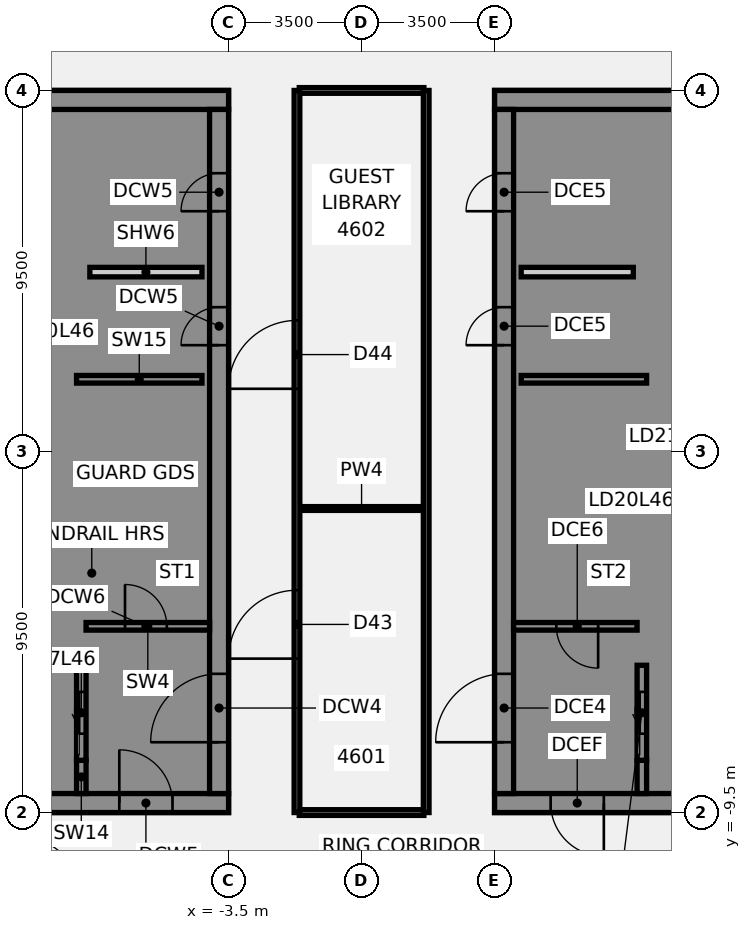
"""IFC4 building model, lengths in metres.
Left out: names, types, materials, properties, quantities, classifications, styles, units other than length and angle.
Written with IfcOpenShell. Run it as: python <this file> out.ifc"""

import sys

from ifc_helpers import new_model, si_unit, direction, frame, frame_2d, origin, place, context, subcontext, project, spatial, polyline, rectangle, outline, extrude, element, fill, save


model = new_model("IFC4")
c1 = context("Model", 3, precision=1e-05, world=origin(), true_north=direction((0.0, 1.0)))
c2 = subcontext(c1, "Body", "Model", "MODEL_VIEW")
j1 = project(units=[si_unit("LENGTHUNIT", "METRE"), si_unit("PLANEANGLEUNIT", "RADIAN")], contexts=[c1])
p1 = place(None, origin())
s1 = spatial("IfcSite", under=j1, at=p1, CompositionType="ELEMENT")
p2 = place(p1, origin())
s2 = spatial("IfcBuilding", under=s1, at=p2, CompositionType="ELEMENT")
p3 = place(p2, frame((0.0, 0.0, 186.1)))
s3 = spatial("IfcBuildingStorey", under=s2, at=p3, CompositionType="ELEMENT", Elevation=186.1)
p4 = place(p3, frame((-1.64, -9.5, 0.0), z_axis=(0.0, 0.0, 1.0), x_axis=(1.0, 0.0, 0.0)))
e1 = element("IfcWall", 1, at=p4, inside=s3, PredefinedType="PARTITIONING", context=c2, shape_type="SweptSolid", body=[
    extrude(rectangle(XDim=3.28, YDim=0.15, at=frame_2d((1.64, 0.0))), origin(), (0.0, 0.0, 1.0), 2.864),
])
p5 = place(p3, frame((-1.64, -1.5, 0.0), z_axis=(0.0, 0.0, 1.0), x_axis=(1.0, 0.0, 0.0)))
e2 = element("IfcWall", 2, at=p5, inside=s3, PredefinedType="PARTITIONING", context=c2, shape_type="SweptSolid", body=[
    extrude(rectangle(XDim=3.28, YDim=0.1, at=frame_2d((1.64, 0.0))), origin(), (0.0, 0.0, 1.0), 2.864),
])
p6 = place(p3, frame((-1.64, 9.5, 0.0), z_axis=(0.0, 0.0, 1.0), x_axis=(1.0, 0.0, 0.0)))
e3 = element("IfcWall", 3, at=p6, inside=s3, PredefinedType="PARTITIONING", context=c2, shape_type="SweptSolid", body=[
    extrude(rectangle(XDim=3.28, YDim=0.15, at=frame_2d((1.64, 0.0))), origin(), (0.0, 0.0, 1.0), 2.864),
])
p7 = place(p3, frame((-1.7, -9.5, 0.0), z_axis=(0.0, 0.0, 1.0), x_axis=(0.0, 1.0, 0.0)))
e4 = element("IfcWall", 4, at=p7, inside=s3, PredefinedType="PARTITIONING", context=c2, shape_type="SweptSolid", body=[
    extrude(rectangle(XDim=19.0, YDim=0.15, at=frame_2d((9.5, 0.0))), origin(), (0.0, 0.0, 1.0), 2.864),
])
p8 = place(p7, frame((4.05, 0.0, 0.0)))
e5 = element("IfcOpeningElement", 5, at=p8, cuts=e4, PredefinedType="OPENING", context=c2, shape_type="SweptSolid", body=[
    extrude(rectangle(XDim=1.8, YDim=2.1, at=frame_2d((0.9, 1.05))), frame((0.0, 0.085, 0.0), z_axis=(0.0, -1.0, 0.0), x_axis=(1.0, 0.0, 0.0)), (0.0, 0.0, 1.0), 0.17),
])
p9 = place(p7, frame((11.15, 0.0, 0.0)))
e6 = element("IfcOpeningElement", 6, at=p9, cuts=e4, PredefinedType="OPENING", context=c2, shape_type="SweptSolid", body=[
    extrude(rectangle(XDim=1.8, YDim=2.1, at=frame_2d((0.9, 1.05))), frame((0.0, 0.085, 0.0), z_axis=(0.0, -1.0, 0.0), x_axis=(1.0, 0.0, 0.0)), (0.0, 0.0, 1.0), 0.17),
])
p10 = place(p3, frame((1.7, -9.5, 0.0), z_axis=(0.0, 0.0, 1.0), x_axis=(0.0, 1.0, 0.0)))
e7 = element("IfcWall", 7, at=p10, inside=s3, PredefinedType="PARTITIONING", context=c2, shape_type="SweptSolid", body=[
    extrude(rectangle(XDim=19.0, YDim=0.15, at=frame_2d((9.5, 0.0))), origin(), (0.0, 0.0, 1.0), 2.864),
])
p11 = place(p3, frame((-16.5, -9.25, 0.0), z_axis=(0.0, 0.0, 1.0), x_axis=(1.0, 0.0, 0.0)))
e8 = element("IfcWall", 8, at=p11, inside=s3, PredefinedType="SHEAR", context=c2, shape_type="SweptSolid", body=[
    extrude(rectangle(XDim=13.0, YDim=0.5, at=frame_2d((6.5, 0.0))), origin(), (0.0, 0.0, 1.0), 3.46),
])
p12 = place(p11, frame((4.15, 0.0, 0.0)))
e9 = element("IfcOpeningElement", 9, at=p12, cuts=e8, PredefinedType="OPENING", context=c2, shape_type="SweptSolid", body=[
    extrude(rectangle(XDim=1.4, YDim=2.1, at=frame_2d((0.7, 1.05))), frame((0.0, 0.26, 0.0), z_axis=(0.0, -1.0, 0.0), x_axis=(1.0, 0.0, 0.0)), (0.0, 0.0, 1.0), 0.52),
])
p13 = place(p11, frame((10.125, 0.0, 0.0)))
e10 = element("IfcOpeningElement", 10, at=p13, cuts=e8, PredefinedType="OPENING", context=c2, shape_type="SweptSolid", body=[
    extrude(rectangle(XDim=1.4, YDim=2.1, at=frame_2d((0.7, 1.05))), frame((0.0, 0.26, 0.0), z_axis=(0.0, -1.0, 0.0), x_axis=(1.0, 0.0, 0.0)), (0.0, 0.0, 1.0), 0.52),
])
p14 = place(p3, frame((-16.5, 9.25, 0.0), z_axis=(0.0, 0.0, 1.0), x_axis=(1.0, 0.0, 0.0)))
e11 = element("IfcWall", 11, at=p14, inside=s3, PredefinedType="SHEAR", context=c2, shape_type="SweptSolid", body=[
    extrude(rectangle(XDim=13.0, YDim=0.5, at=frame_2d((6.5, 0.0))), origin(), (0.0, 0.0, 1.0), 3.46),
])
p15 = place(p3, origin())
e12 = element("IfcWall", 12, at=p15, inside=s3, PredefinedType="SHEAR", context=c2, shape_type="SweptSolid", body=[
    extrude(outline(polyline([(-9.8, -5.375), (-9.8, -5.625), (-7.5, -5.625), (-7.25, -5.625), (-7.25, 9.0), (-7.5, 9.0), (-9.8, 9.0), (-9.8, 8.125), (-7.5, 8.125), (-7.5, 5.625), (-9.8, 5.625), (-9.8, 5.375), (-7.5, 5.375), (-7.5, 2.875), (-9.8, 2.875), (-9.8, 2.625), (-7.5, 2.625), (-7.5, 0.125), (-9.8, 0.125), (-9.8, -0.125), (-7.5, -0.125), (-7.5, -2.625), (-9.8, -2.625), (-9.8, -2.875), (-7.5, -2.875), (-7.5, -5.375), (-9.8, -5.375)])), origin(), (0.0, 0.0, 1.0), 3.46),
])
p16 = place(p3, origin())
e13 = element("IfcWall", 13, at=p16, inside=s3, PredefinedType="SHEAR", context=c2, shape_type="SweptSolid", body=[
    extrude(outline(polyline([(-7.5, -8.125), (-9.55, -8.125), (-9.55, -5.625), (-9.8, -5.625), (-9.8, -8.125), (-9.8, -9.0), (-7.5, -9.0), (-7.5, -8.125)])), origin(), (0.0, 0.0, 1.0), 3.46),
])
p17 = place(p3, frame((-7.375, -9.0, 0.0), z_axis=(0.0, 0.0, 1.0), x_axis=(0.0, 1.0, 0.0)))
e14 = element("IfcWall", 14, at=p17, inside=s3, PredefinedType="SHEAR", context=c2, shape_type="SweptSolid", body=[
    extrude(rectangle(XDim=0.875, YDim=0.25, at=frame_2d((0.438, 0.0))), origin(), (0.0, 0.0, 1.0), 3.46),
])
p18 = place(p3, frame((-7.5, 1.9, 0.0), z_axis=(0.0, 0.0, 1.0), x_axis=(1.0, 0.0, 0.0)))
e15 = element("IfcWall", 15, at=p18, inside=s3, PredefinedType="SHEAR", context=c2, shape_type="SweptSolid", body=[
    extrude(rectangle(XDim=3.3, YDim=0.2, at=frame_2d((1.65, 0.0))), origin(), (0.0, 0.0, 1.0), 3.46),
])
p19 = place(p3, frame((-7.375, -8.125, 0.0), z_axis=(0.0, 0.0, 1.0), x_axis=(0.0, 1.0, 0.0)))
e16 = element("IfcWall", 16, at=p19, inside=s3, PredefinedType="SHEAR", context=c2, shape_type="SweptSolid", body=[
    extrude(rectangle(XDim=2.5, YDim=0.25, at=frame_2d((1.25, 0.0))), origin(), (0.0, 0.0, 1.0), 3.46),
])
p20 = place(p19, frame((0.7, 0.0, 0.0)))
e17 = element("IfcOpeningElement", 17, at=p20, cuts=e16, PredefinedType="OPENING", context=c2, shape_type="SweptSolid", body=[
    extrude(rectangle(XDim=1.1, YDim=2.1, at=frame_2d((0.55, 1.05))), frame((0.0, 0.135, 0.0), z_axis=(0.0, -1.0, 0.0), x_axis=(1.0, 0.0, 0.0)), (0.0, 0.0, 1.0), 0.27),
])
p21 = place(p3, frame((-3.75, -9.0, 0.0), z_axis=(0.0, 0.0, 1.0), x_axis=(0.0, 1.0, 0.0)))
e18 = element("IfcWall", 18, at=p21, inside=s3, PredefinedType="SHEAR", context=c2, shape_type="SweptSolid", body=[
    extrude(rectangle(XDim=18.0, YDim=0.5, at=frame_2d((9.0, 0.0))), origin(), (0.0, 0.0, 1.0), 3.46),
])
p22 = place(p21, frame((1.35, 0.0, 0.0)))
e19 = element("IfcOpeningElement", 19, at=p22, cuts=e18, PredefinedType="OPENING", context=c2, shape_type="SweptSolid", body=[
    extrude(rectangle(XDim=1.8, YDim=2.1, at=frame_2d((0.9, 1.05))), frame((0.0, 0.26, 0.0), z_axis=(0.0, -1.0, 0.0), x_axis=(1.0, 0.0, 0.0)), (0.0, 0.0, 1.0), 0.52),
])
p23 = place(p21, frame((11.798, 0.0, 0.0)))
e20 = element("IfcOpeningElement", 20, at=p23, cuts=e18, PredefinedType="OPENING", context=c2, shape_type="SweptSolid", body=[
    extrude(rectangle(XDim=1.0, YDim=2.1, at=frame_2d((0.5, 1.05))), frame((0.0, 0.26, 0.0), z_axis=(0.0, -1.0, 0.0), x_axis=(1.0, 0.0, 0.0)), (0.0, 0.0, 1.0), 0.52),
])
p24 = place(p21, frame((15.323, 0.0, 0.0)))
e21 = element("IfcOpeningElement", 21, at=p24, cuts=e18, PredefinedType="OPENING", context=c2, shape_type="SweptSolid", body=[
    extrude(rectangle(XDim=1.0, YDim=2.1, at=frame_2d((0.5, 1.05))), frame((0.0, 0.26, 0.0), z_axis=(0.0, -1.0, 0.0), x_axis=(1.0, 0.0, 0.0)), (0.0, 0.0, 1.0), 0.52),
])
p25 = place(p3, frame((-7.15, 4.72, 0.0), z_axis=(0.0, 0.0, 1.0), x_axis=(1.0, 0.0, 0.0)))
e22 = element("IfcWall", 22, at=p25, inside=s3, PredefinedType="PARTITIONING", context=c2, shape_type="SweptSolid", body=[
    extrude(rectangle(XDim=2.95, YDim=0.25, at=frame_2d((1.475, 0.0))), origin(), (0.0, 0.0, 1.0), 3.46),
])
p26 = place(p3, frame((-7.25, -4.6, 0.0), z_axis=(0.0, 0.0, 1.0), x_axis=(1.0, 0.0, 0.0)))
e23 = element("IfcWall", 23, at=p26, inside=s3, PredefinedType="SHEAR", context=c2, shape_type="SweptSolid", body=[
    extrude(rectangle(XDim=3.25, YDim=0.2, at=frame_2d((1.625, 0.0))), origin(), (0.0, 0.0, 1.0), 3.46),
])
p27 = place(p26, frame((1.025, 0.0, 0.0)))
e24 = element("IfcOpeningElement", 24, at=p27, cuts=e23, PredefinedType="OPENING", context=c2, shape_type="SweptSolid", body=[
    extrude(rectangle(XDim=1.1, YDim=2.1, at=frame_2d((0.55, 1.05))), frame((0.0, 0.11, 0.0), z_axis=(0.0, -1.0, 0.0), x_axis=(1.0, 0.0, 0.0)), (0.0, 0.0, 1.0), 0.22),
])
p28 = place(p3, frame((16.5, -9.25, 0.0), z_axis=(0.0, 0.0, 1.0), x_axis=(-1.0, 0.0, 0.0)))
e25 = element("IfcWall", 25, at=p28, inside=s3, PredefinedType="SHEAR", context=c2, shape_type="SweptSolid", body=[
    extrude(rectangle(XDim=13.0, YDim=0.5, at=frame_2d((6.5, 0.0))), origin(), (0.0, 0.0, 1.0), 3.46),
])
p29 = place(p28, frame((4.15, 0.0, 0.0)))
e26 = element("IfcOpeningElement", 26, at=p29, cuts=e25, PredefinedType="OPENING", context=c2, shape_type="SweptSolid", body=[
    extrude(rectangle(XDim=1.4, YDim=2.1, at=frame_2d((0.7, 1.05))), frame((0.0, 0.26, 0.0), z_axis=(0.0, -1.0, 0.0), x_axis=(1.0, 0.0, 0.0)), (0.0, 0.0, 1.0), 0.52),
])
p30 = place(p28, frame((10.125, 0.0, 0.0)))
e27 = element("IfcOpeningElement", 27, at=p30, cuts=e25, PredefinedType="OPENING", context=c2, shape_type="SweptSolid", body=[
    extrude(rectangle(XDim=1.4, YDim=2.1, at=frame_2d((0.7, 1.05))), frame((0.0, 0.26, 0.0), z_axis=(0.0, -1.0, 0.0), x_axis=(1.0, 0.0, 0.0)), (0.0, 0.0, 1.0), 0.52),
])
p31 = place(p3, frame((16.5, 9.25, 0.0), z_axis=(0.0, 0.0, 1.0), x_axis=(-1.0, 0.0, 0.0)))
e28 = element("IfcWall", 28, at=p31, inside=s3, PredefinedType="SHEAR", context=c2, shape_type="SweptSolid", body=[
    extrude(rectangle(XDim=13.0, YDim=0.5, at=frame_2d((6.5, 0.0))), origin(), (0.0, 0.0, 1.0), 3.46),
])
p32 = place(p3, origin())
e29 = element("IfcWall", 29, at=p32, inside=s3, PredefinedType="SHEAR", context=c2, shape_type="SweptSolid", body=[
    extrude(outline(polyline([(9.8, -5.375), (7.5, -5.375), (7.5, -2.875), (9.8, -2.875), (9.8, -2.625), (7.5, -2.625), (7.5, -0.125), (9.8, -0.125), (9.8, 0.125), (7.5, 0.125), (7.5, 2.625), (9.8, 2.625), (9.8, 2.875), (7.5, 2.875), (7.5, 5.375), (9.8, 5.375), (9.8, 5.625), (7.5, 5.625), (7.5, 8.125), (9.8, 8.125), (9.8, 9.0), (7.5, 9.0), (7.25, 9.0), (7.25, -5.625), (7.5, -5.625), (9.8, -5.625), (9.8, -5.375)])), origin(), (0.0, 0.0, 1.0), 3.46),
])
p33 = place(p3, origin())
e30 = element("IfcWall", 30, at=p33, inside=s3, PredefinedType="SHEAR", context=c2, shape_type="SweptSolid", body=[
    extrude(outline(polyline([(7.5, -8.125), (7.5, -9.0), (9.8, -9.0), (9.8, -8.125), (9.8, -5.625), (9.55, -5.625), (9.55, -8.125), (7.5, -8.125)])), origin(), (0.0, 0.0, 1.0), 3.46),
])
p34 = place(p3, frame((7.375, -9.0, 0.0), z_axis=(0.0, 0.0, 1.0), x_axis=(0.0, 1.0, 0.0)))
e31 = element("IfcWall", 31, at=p34, inside=s3, PredefinedType="SHEAR", context=c2, shape_type="SweptSolid", body=[
    extrude(rectangle(XDim=0.875, YDim=0.25, at=frame_2d((0.438, 0.0))), origin(), (0.0, 0.0, 1.0), 3.46),
])
p35 = place(p3, frame((7.5, 1.9, 0.0), z_axis=(0.0, 0.0, 1.0), x_axis=(-1.0, 0.0, 0.0)))
e32 = element("IfcWall", 32, at=p35, inside=s3, PredefinedType="SHEAR", context=c2, shape_type="SweptSolid", body=[
    extrude(rectangle(XDim=3.3, YDim=0.2, at=frame_2d((1.65, 0.0))), origin(), (0.0, 0.0, 1.0), 3.46),
])
p36 = place(p3, frame((7.375, -8.125, 0.0), z_axis=(0.0, 0.0, 1.0), x_axis=(0.0, 1.0, 0.0)))
e33 = element("IfcWall", 33, at=p36, inside=s3, PredefinedType="SHEAR", context=c2, shape_type="SweptSolid", body=[
    extrude(rectangle(XDim=2.5, YDim=0.25, at=frame_2d((1.25, 0.0))), origin(), (0.0, 0.0, 1.0), 3.46),
])
p37 = place(p36, frame((0.7, 0.0, 0.0)))
e34 = element("IfcOpeningElement", 34, at=p37, cuts=e33, PredefinedType="OPENING", context=c2, shape_type="SweptSolid", body=[
    extrude(rectangle(XDim=1.1, YDim=2.1, at=frame_2d((0.55, 1.05))), frame((0.0, 0.135, 0.0), z_axis=(0.0, -1.0, 0.0), x_axis=(1.0, 0.0, 0.0)), (0.0, 0.0, 1.0), 0.27),
])
p38 = place(p3, frame((3.75, -9.0, 0.0), z_axis=(0.0, 0.0, 1.0), x_axis=(0.0, 1.0, 0.0)))
e35 = element("IfcWall", 35, at=p38, inside=s3, PredefinedType="SHEAR", context=c2, shape_type="SweptSolid", body=[
    extrude(rectangle(XDim=18.0, YDim=0.5, at=frame_2d((9.0, 0.0))), origin(), (0.0, 0.0, 1.0), 3.46),
])
p39 = place(p38, frame((1.35, 0.0, 0.0)))
e36 = element("IfcOpeningElement", 36, at=p39, cuts=e35, PredefinedType="OPENING", context=c2, shape_type="SweptSolid", body=[
    extrude(rectangle(XDim=1.8, YDim=2.1, at=frame_2d((0.9, 1.05))), frame((0.0, 0.26, 0.0), z_axis=(0.0, -1.0, 0.0), x_axis=(1.0, 0.0, 0.0)), (0.0, 0.0, 1.0), 0.52),
])
p40 = place(p38, frame((11.798, 0.0, 0.0)))
e37 = element("IfcOpeningElement", 37, at=p40, cuts=e35, PredefinedType="OPENING", context=c2, shape_type="SweptSolid", body=[
    extrude(rectangle(XDim=1.0, YDim=2.1, at=frame_2d((0.5, 1.05))), frame((0.0, 0.26, 0.0), z_axis=(0.0, -1.0, 0.0), x_axis=(1.0, 0.0, 0.0)), (0.0, 0.0, 1.0), 0.52),
])
p41 = place(p38, frame((15.323, 0.0, 0.0)))
e38 = element("IfcOpeningElement", 38, at=p41, cuts=e35, PredefinedType="OPENING", context=c2, shape_type="SweptSolid", body=[
    extrude(rectangle(XDim=1.0, YDim=2.1, at=frame_2d((0.5, 1.05))), frame((0.0, 0.26, 0.0), z_axis=(0.0, -1.0, 0.0), x_axis=(1.0, 0.0, 0.0)), (0.0, 0.0, 1.0), 0.52),
])
p42 = place(p3, frame((7.15, 4.72, 0.0), z_axis=(0.0, 0.0, 1.0), x_axis=(-1.0, 0.0, 0.0)))
e39 = element("IfcWall", 39, at=p42, inside=s3, PredefinedType="PARTITIONING", context=c2, shape_type="SweptSolid", body=[
    extrude(rectangle(XDim=2.95, YDim=0.25, at=frame_2d((1.475, 0.0))), origin(), (0.0, 0.0, 1.0), 3.46),
])
p43 = place(p3, frame((7.25, -4.6, 0.0), z_axis=(0.0, 0.0, 1.0), x_axis=(-1.0, 0.0, 0.0)))
e40 = element("IfcWall", 40, at=p43, inside=s3, PredefinedType="SHEAR", context=c2, shape_type="SweptSolid", body=[
    extrude(rectangle(XDim=3.25, YDim=0.2, at=frame_2d((1.625, 0.0))), origin(), (0.0, 0.0, 1.0), 3.46),
])
p44 = place(p43, frame((1.025, 0.0, 0.0)))
e41 = element("IfcOpeningElement", 41, at=p44, cuts=e40, PredefinedType="OPENING", context=c2, shape_type="SweptSolid", body=[
    extrude(rectangle(XDim=1.1, YDim=2.1, at=frame_2d((0.55, 1.05))), frame((0.0, 0.11, 0.0), z_axis=(0.0, -1.0, 0.0), x_axis=(1.0, 0.0, 0.0)), (0.0, 0.0, 1.0), 0.22),
])
p45 = place(p8, frame((1.8, 0.0, 0.0), z_axis=(0.0, 0.0, 1.0), x_axis=(-1.0, 0.0, 0.0)))
e42 = element("IfcDoor", 42, at=p45, inside=s3, OperationType="DOUBLE_DOOR_SINGLE_SWING", PredefinedType="DOOR", context=c2, shape_type="SweptSolid", body=[
    extrude(rectangle(XDim=1.8, YDim=2.1, at=frame_2d((0.9, 1.05))), frame((0.0, 0.025, 0.0), z_axis=(0.0, -1.0, 0.0), x_axis=(1.0, 0.0, 0.0)), (0.0, 0.0, 1.0), 0.05),
])
fill(e5, e42)
p46 = place(p9, frame((1.8, 0.0, 0.0), z_axis=(0.0, 0.0, 1.0), x_axis=(-1.0, 0.0, 0.0)))
e43 = element("IfcDoor", 43, at=p46, inside=s3, OperationType="DOUBLE_DOOR_SINGLE_SWING", PredefinedType="DOOR", context=c2, shape_type="SweptSolid", body=[
    extrude(rectangle(XDim=1.8, YDim=2.1, at=frame_2d((0.9, 1.05))), frame((0.0, 0.025, 0.0), z_axis=(0.0, -1.0, 0.0), x_axis=(1.0, 0.0, 0.0)), (0.0, 0.0, 1.0), 0.05),
])
fill(e6, e43)
p47 = place(p13, origin())
e44 = element("IfcDoor", 44, at=p47, inside=s3, OperationType="SINGLE_SWING_LEFT", PredefinedType="DOOR", context=c2, shape_type="SweptSolid", body=[
    extrude(rectangle(XDim=1.4, YDim=2.1, at=frame_2d((0.7, 1.05))), frame((0.0, 0.025, 0.0), z_axis=(0.0, -1.0, 0.0), x_axis=(1.0, 0.0, 0.0)), (0.0, 0.0, 1.0), 0.05),
])
fill(e10, e44)
p48 = place(p22, origin())
e45 = element("IfcDoor", 45, at=p48, inside=s3, OperationType="SINGLE_SWING_LEFT", PredefinedType="DOOR", context=c2, shape_type="SweptSolid", body=[
    extrude(rectangle(XDim=1.8, YDim=2.1, at=frame_2d((0.9, 1.05))), frame((0.0, 0.025, 0.0), z_axis=(0.0, -1.0, 0.0), x_axis=(1.0, 0.0, 0.0)), (0.0, 0.0, 1.0), 0.05),
])
fill(e19, e45)
p49 = place(p23, origin())
e46 = element("IfcDoor", 46, at=p49, inside=s3, OperationType="SINGLE_SWING_LEFT", PredefinedType="DOOR", context=c2, shape_type="SweptSolid", body=[
    extrude(rectangle(XDim=1.0, YDim=2.1, at=frame_2d((0.5, 1.05))), frame((0.0, 0.225, 0.0), z_axis=(0.0, -1.0, 0.0), x_axis=(1.0, 0.0, 0.0)), (0.0, 0.0, 1.0), 0.05),
])
fill(e20, e46)
p50 = place(p24, origin())
e47 = element("IfcDoor", 47, at=p50, inside=s3, OperationType="SINGLE_SWING_LEFT", PredefinedType="DOOR", context=c2, shape_type="SweptSolid", body=[
    extrude(rectangle(XDim=1.0, YDim=2.1, at=frame_2d((0.5, 1.05))), frame((0.0, 0.225, 0.0), z_axis=(0.0, -1.0, 0.0), x_axis=(1.0, 0.0, 0.0)), (0.0, 0.0, 1.0), 0.05),
])
fill(e21, e47)
p51 = place(p27, origin())
e48 = element("IfcDoor", 48, at=p51, inside=s3, OperationType="SINGLE_SWING_LEFT", PredefinedType="DOOR", context=c2, shape_type="SweptSolid", body=[
    extrude(rectangle(XDim=1.1, YDim=2.1, at=frame_2d((0.55, 1.05))), frame((0.0, 0.025, 0.0), z_axis=(0.0, -1.0, 0.0), x_axis=(1.0, 0.0, 0.0)), (0.0, 0.0, 1.0), 0.05),
])
fill(e24, e48)
p52 = place(p20, origin())
e49 = element("IfcDoor", 49, at=p52, inside=s3, OperationType="SLIDING_TO_LEFT", PredefinedType="DOOR", context=c2, shape_type="SweptSolid", body=[
    extrude(rectangle(XDim=1.1, YDim=2.1, at=frame_2d((0.55, 1.05))), frame((0.0, 0.025, 0.0), z_axis=(0.0, -1.0, 0.0), x_axis=(1.0, 0.0, 0.0)), (0.0, 0.0, 1.0), 0.05),
])
fill(e17, e49)
p53 = place(p30, origin())
e50 = element("IfcDoor", 50, at=p53, inside=s3, OperationType="SINGLE_SWING_LEFT", PredefinedType="DOOR", context=c2, shape_type="SweptSolid", body=[
    extrude(rectangle(XDim=1.4, YDim=2.1, at=frame_2d((0.7, 1.05))), frame((0.0, 0.025, 0.0), z_axis=(0.0, -1.0, 0.0), x_axis=(1.0, 0.0, 0.0)), (0.0, 0.0, 1.0), 0.05),
])
fill(e27, e50)
p54 = place(p39, origin())
e51 = element("IfcDoor", 51, at=p54, inside=s3, OperationType="SINGLE_SWING_LEFT", PredefinedType="DOOR", context=c2, shape_type="SweptSolid", body=[
    extrude(rectangle(XDim=1.8, YDim=2.1, at=frame_2d((0.9, 1.05))), frame((0.0, 0.025, 0.0), z_axis=(0.0, -1.0, 0.0), x_axis=(1.0, 0.0, 0.0)), (0.0, 0.0, 1.0), 0.05),
])
fill(e36, e51)
p55 = place(p40, origin())
e52 = element("IfcDoor", 52, at=p55, inside=s3, OperationType="SINGLE_SWING_LEFT", PredefinedType="DOOR", context=c2, shape_type="SweptSolid", body=[
    extrude(rectangle(XDim=1.0, YDim=2.1, at=frame_2d((0.5, 1.05))), frame((0.0, -0.175, 0.0), z_axis=(0.0, -1.0, 0.0), x_axis=(1.0, 0.0, 0.0)), (0.0, 0.0, 1.0), 0.05),
])
fill(e37, e52)
p56 = place(p41, origin())
e53 = element("IfcDoor", 53, at=p56, inside=s3, OperationType="SINGLE_SWING_LEFT", PredefinedType="DOOR", context=c2, shape_type="SweptSolid", body=[
    extrude(rectangle(XDim=1.0, YDim=2.1, at=frame_2d((0.5, 1.05))), frame((0.0, -0.175, 0.0), z_axis=(0.0, -1.0, 0.0), x_axis=(1.0, 0.0, 0.0)), (0.0, 0.0, 1.0), 0.05),
])
fill(e38, e53)
p57 = place(p44, origin())
e54 = element("IfcDoor", 54, at=p57, inside=s3, OperationType="SINGLE_SWING_LEFT", PredefinedType="DOOR", context=c2, shape_type="SweptSolid", body=[
    extrude(rectangle(XDim=1.1, YDim=2.1, at=frame_2d((0.55, 1.05))), frame((0.0, 0.025, 0.0), z_axis=(0.0, -1.0, 0.0), x_axis=(1.0, 0.0, 0.0)), (0.0, 0.0, 1.0), 0.05),
])
fill(e41, e54)
p58 = place(p37, origin())
e55 = element("IfcDoor", 55, at=p58, inside=s3, OperationType="SLIDING_TO_LEFT", PredefinedType="DOOR", context=c2, shape_type="SweptSolid", body=[
    extrude(rectangle(XDim=1.1, YDim=2.1, at=frame_2d((0.55, 1.05))), frame((0.0, 0.025, 0.0), z_axis=(0.0, -1.0, 0.0), x_axis=(1.0, 0.0, 0.0)), (0.0, 0.0, 1.0), 0.05),
])
fill(e34, e55)
save(model, sys.argv[1])
